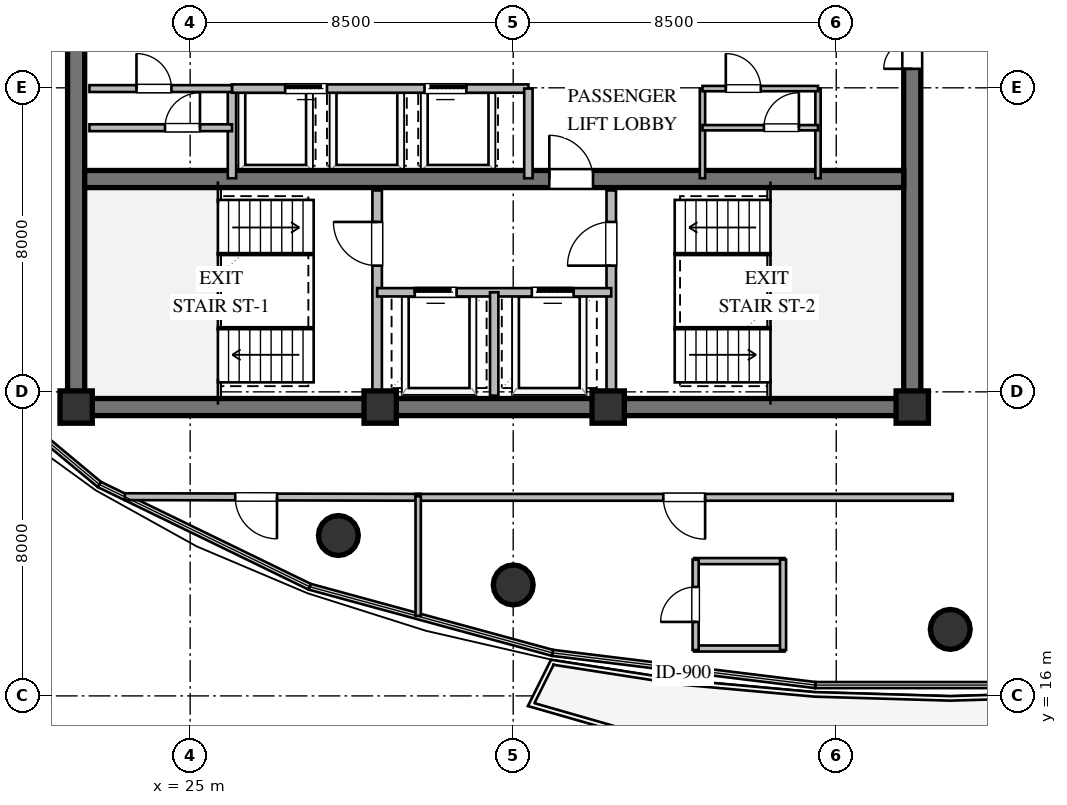
"""IFC4 building model, lengths in metres.
Left out: names, types, materials, properties, quantities, classifications, styles, units other than length and angle.
Written with IfcOpenShell. Run it as: python <this file> out.ifc"""

import sys

from ifc_helpers import new_model, si_unit, direction, frame, frame_2d, origin, origin_2d, place, context, subcontext, project, spatial, rectangle, circle, extrude, element, fill, save


model = new_model("IFC4")
c1 = context("Model", 3, precision=1e-05, world=origin(), true_north=direction((0.0, 1.0)))
c2 = subcontext(c1, "Body", "Model", "MODEL_VIEW")
j1 = project(units=[si_unit("LENGTHUNIT", "METRE"), si_unit("PLANEANGLEUNIT", "RADIAN")], contexts=[c1])
p1 = place(None, origin())
s1 = spatial("IfcSite", under=j1, at=p1, CompositionType="ELEMENT")
p2 = place(p1, origin())
s2 = spatial("IfcBuilding", under=s1, at=p2, CompositionType="ELEMENT")
p3 = place(p2, frame((0.0, 0.0, 224.4)))
s3 = spatial("IfcBuildingStorey", under=s2, at=p3, CompositionType="ELEMENT", Elevation=224.4)
p4 = place(p3, frame((21.775, 23.6, 0.0), z_axis=(0.0, 0.0, 1.0), x_axis=(1.0, 0.0, 0.0)))
e1 = element("IfcWall", 1, at=p4, inside=s3, PredefinedType="SHEAR", context=c2, shape_type="SweptSolid", body=[
    extrude(rectangle(XDim=22.45, YDim=0.45, at=frame_2d((11.225, 0.0))), origin(), (0.0, 0.0, 1.0), 3.36),
])
p5 = place(p3, frame((22.0, 23.825, 0.0), z_axis=(0.0, 0.0, 1.0), x_axis=(0.0, 1.0, 0.0)))
e2 = element("IfcWall", 2, at=p5, inside=s3, PredefinedType="SHEAR", context=c2, shape_type="SweptSolid", body=[
    extrude(rectangle(XDim=12.35, YDim=0.45, at=frame_2d((6.175, 0.0))), origin(), (0.0, 0.0, 1.0), 3.36),
])
p6 = place(p3, frame((44.0, 23.825, 0.0), z_axis=(0.0, 0.0, 1.0), x_axis=(0.0, 1.0, 0.0)))
e3 = element("IfcWall", 3, at=p6, inside=s3, PredefinedType="SHEAR", context=c2, shape_type="SweptSolid", body=[
    extrude(rectangle(XDim=12.35, YDim=0.45, at=frame_2d((6.175, 0.0))), origin(), (0.0, 0.0, 1.0), 3.36),
])
p7 = place(p6, frame((8.675, 0.0, 0.0)))
e4 = element("IfcOpeningElement", 4, at=p7, cuts=e3, PredefinedType="OPENING", context=c2, shape_type="SweptSolid", body=[
    extrude(rectangle(XDim=1.5, YDim=2.15, at=frame_2d((0.75, 1.075))), frame((0.0, 0.235, 0.0), z_axis=(0.0, -1.0, 0.0), x_axis=(1.0, 0.0, 0.0)), (0.0, 0.0, 1.0), 0.47),
])
p8 = place(p3, frame((22.225, 29.6, 0.0), z_axis=(0.0, 0.0, 1.0), x_axis=(1.0, 0.0, 0.0)))
e5 = element("IfcWall", 5, at=p8, inside=s3, PredefinedType="SHEAR", context=c2, shape_type="SweptSolid", body=[
    extrude(rectangle(XDim=21.55, YDim=0.45, at=frame_2d((10.775, 0.0))), origin(), (0.0, 0.0, 1.0), 3.36),
])
p9 = place(p8, frame((12.225, 0.0, 0.0)))
e6 = element("IfcOpeningElement", 6, at=p9, cuts=e5, PredefinedType="OPENING", context=c2, shape_type="SweptSolid", body=[
    extrude(rectangle(XDim=1.15, YDim=2.1, at=frame_2d((0.575, 1.05))), frame((0.0, 0.235, 0.0), z_axis=(0.0, -1.0, 0.0), x_axis=(1.0, 0.0, 0.0)), (0.0, 0.0, 1.0), 0.47),
])
for number, where, z_axis, x_axis in (
    (7, (22.0, 23.6, 0.0), (0.0, 0.0, 1.0), (1.0, 0.0, 0.0)),
    (8, (30.0, 23.6, 0.0), (0.0, 0.0, 1.0), (1.0, 0.0, 0.0)),
    (9, (36.0, 23.6, 0.0), (0.0, 0.0, 1.0), (1.0, 0.0, 0.0)),
    (10, (44.0, 23.6, 0.0), (0.0, 0.0, 1.0), (1.0, 0.0, 0.0)),
):
    element("IfcColumn", number, at=place(p3, frame(where, z_axis=z_axis, x_axis=x_axis)), inside=s3, PredefinedType="COLUMN", context=c2, shape_type="SweptSolid", body=[
        extrude(rectangle(XDim=0.85, YDim=0.85, at=origin_2d()), origin(), (0.0, 0.0, 1.0), 3.6),
    ])
for number, where, z_axis, x_axis in (
    (11, (28.9, 20.22, 0.0), (0.0, 0.0, 1.0), (1.0, 0.0, 0.0)),
    (12, (33.5, 18.92, 0.0), (0.0, 0.0, 1.0), (1.0, 0.0, 0.0)),
    (13, (45.0, 17.75, 0.0), (0.0, 0.0, 1.0), (1.0, 0.0, 0.0)),
):
    element("IfcColumn", number, at=place(p3, frame(where, z_axis=z_axis, x_axis=x_axis)), inside=s3, PredefinedType="COLUMN", context=c2, shape_type="SweptSolid", body=[
        extrude(circle(Radius=0.525, at=origin_2d()), origin(), (0.0, 0.0, 1.0), 3.6),
    ])
p10 = place(p3, frame((29.92, 23.9, 0.0), z_axis=(0.0, 0.0, 1.0), x_axis=(0.0, 1.0, 0.0)))
e14 = element("IfcWall", 14, at=p10, inside=s3, PredefinedType="SOLIDWALL", context=c2, shape_type="SweptSolid", body=[
    extrude(rectangle(XDim=5.4, YDim=0.25, at=frame_2d((2.7, 0.0))), origin(), (0.0, 0.0, 1.0), 3.36),
])
p11 = place(p10, frame((3.421, 0.0, 0.0)))
e15 = element("IfcOpeningElement", 15, at=p11, cuts=e14, PredefinedType="OPENING", context=c2, shape_type="SweptSolid", body=[
    extrude(rectangle(XDim=1.15, YDim=2.1, at=frame_2d((0.575, 1.05))), frame((0.0, 0.135, 0.0), z_axis=(0.0, -1.0, 0.0), x_axis=(1.0, 0.0, 0.0)), (0.0, 0.0, 1.0), 0.27),
])
p12 = place(p3, frame((36.08, 23.9, 0.0), z_axis=(0.0, 0.0, 1.0), x_axis=(0.0, 1.0, 0.0)))
e16 = element("IfcWall", 16, at=p12, inside=s3, PredefinedType="SOLIDWALL", context=c2, shape_type="SweptSolid", body=[
    extrude(rectangle(XDim=5.4, YDim=0.25, at=frame_2d((2.7, 0.0))), origin(), (0.0, 0.0, 1.0), 3.36),
])
p13 = place(p12, frame((3.421, 0.0, 0.0)))
e17 = element("IfcOpeningElement", 17, at=p13, cuts=e16, PredefinedType="OPENING", context=c2, shape_type="SweptSolid", body=[
    extrude(rectangle(XDim=1.15, YDim=2.1, at=frame_2d((0.575, 1.05))), frame((0.0, 0.135, 0.0), z_axis=(0.0, -1.0, 0.0), x_axis=(1.0, 0.0, 0.0)), (0.0, 0.0, 1.0), 0.27),
])
p14 = place(p3, frame((29.92, 26.62, 0.0), z_axis=(0.0, 0.0, 1.0), x_axis=(1.0, 0.0, 0.0)))
e18 = element("IfcWall", 18, at=p14, inside=s3, PredefinedType="SOLIDWALL", context=c2, shape_type="SweptSolid", body=[
    extrude(rectangle(XDim=6.16, YDim=0.22, at=frame_2d((3.08, 0.0))), origin(), (0.0, 0.0, 1.0), 3.36),
])
p15 = place(p14, frame((0.99, 0.0, 0.0)))
e19 = element("IfcOpeningElement", 19, at=p15, cuts=e18, PredefinedType="OPENING", context=c2, shape_type="SweptSolid", body=[
    extrude(rectangle(XDim=1.1, YDim=2.1, at=frame_2d((0.55, 1.05))), frame((0.0, 0.12, 0.0), z_axis=(0.0, -1.0, 0.0), x_axis=(1.0, 0.0, 0.0)), (0.0, 0.0, 1.0), 0.24),
])
p16 = place(p14, frame((4.07, 0.0, 0.0)))
e20 = element("IfcOpeningElement", 20, at=p16, cuts=e18, PredefinedType="OPENING", context=c2, shape_type="SweptSolid", body=[
    extrude(rectangle(XDim=1.1, YDim=2.1, at=frame_2d((0.55, 1.05))), frame((0.0, 0.12, 0.0), z_axis=(0.0, -1.0, 0.0), x_axis=(1.0, 0.0, 0.0)), (0.0, 0.0, 1.0), 0.24),
])
p17 = place(p3, frame((33.0, 23.9, 0.0), z_axis=(0.0, 0.0, 1.0), x_axis=(0.0, 1.0, 0.0)))
e21 = element("IfcWall", 21, at=p17, inside=s3, PredefinedType="SOLIDWALL", context=c2, shape_type="SweptSolid", body=[
    extrude(rectangle(XDim=2.72, YDim=0.22, at=frame_2d((1.36, 0.0))), origin(), (0.0, 0.0, 1.0), 3.36),
])
p18 = place(p3, frame((26.1, 29.62, 0.0), z_axis=(0.0, 0.0, 1.0), x_axis=(0.0, 1.0, 0.0)))
e22 = element("IfcWall", 22, at=p18, inside=s3, PredefinedType="SOLIDWALL", context=c2, shape_type="SweptSolid", body=[
    extrude(rectangle(XDim=2.36, YDim=0.22, at=frame_2d((1.18, 0.0))), origin(), (0.0, 0.0, 1.0), 3.36),
])
p19 = place(p3, frame((26.1, 31.98, 0.0), z_axis=(0.0, 0.0, 1.0), x_axis=(1.0, 0.0, 0.0)))
e23 = element("IfcWall", 23, at=p19, inside=s3, PredefinedType="SOLIDWALL", context=c2, shape_type="SweptSolid", body=[
    extrude(rectangle(XDim=7.8, YDim=0.22, at=frame_2d((3.9, 0.0))), origin(), (0.0, 0.0, 1.0), 3.36),
])
p20 = place(p19, frame((1.4, 0.0, 0.0)))
e24 = element("IfcOpeningElement", 24, at=p20, cuts=e23, PredefinedType="OPENING", context=c2, shape_type="SweptSolid", body=[
    extrude(rectangle(XDim=1.1, YDim=2.1, at=frame_2d((0.55, 1.05))), frame((0.0, 0.12, 0.0), z_axis=(0.0, -1.0, 0.0), x_axis=(1.0, 0.0, 0.0)), (0.0, 0.0, 1.0), 0.24),
])
p21 = place(p19, frame((5.066, 0.0, 0.0)))
e25 = element("IfcOpeningElement", 25, at=p21, cuts=e23, PredefinedType="OPENING", context=c2, shape_type="SweptSolid", body=[
    extrude(rectangle(XDim=1.1, YDim=2.1, at=frame_2d((0.55, 1.05))), frame((0.0, 0.12, 0.0), z_axis=(0.0, -1.0, 0.0), x_axis=(1.0, 0.0, 0.0)), (0.0, 0.0, 1.0), 0.24),
])
p22 = place(p3, frame((33.9, 29.62, 0.0), z_axis=(0.0, 0.0, 1.0), x_axis=(0.0, 1.0, 0.0)))
e26 = element("IfcWall", 26, at=p22, inside=s3, PredefinedType="SOLIDWALL", context=c2, shape_type="SweptSolid", body=[
    extrude(rectangle(XDim=2.36, YDim=0.22, at=frame_2d((1.18, 0.0))), origin(), (0.0, 0.0, 1.0), 3.36),
])
p23 = place(p3, frame((22.35, 30.95, 0.0), z_axis=(0.0, 0.0, 1.0), x_axis=(1.0, 0.0, 0.0)))
e27 = element("IfcWall", 27, at=p23, inside=s3, PredefinedType="PARTITIONING", context=c2, shape_type="SweptSolid", body=[
    extrude(rectangle(XDim=3.75, YDim=0.18, at=frame_2d((1.875, 0.0))), origin(), (0.0, 0.0, 1.0), 3.36),
])
p24 = place(p23, frame((1.988, 0.0, 0.0)))
e28 = element("IfcOpeningElement", 28, at=p24, cuts=e27, PredefinedType="OPENING", context=c2, shape_type="SweptSolid", body=[
    extrude(rectangle(XDim=0.92, YDim=2.1, at=frame_2d((0.46, 1.05))), frame((0.0, 0.1, 0.0), z_axis=(0.0, -1.0, 0.0), x_axis=(1.0, 0.0, 0.0)), (0.0, 0.0, 1.0), 0.2),
])
p25 = place(p3, frame((22.35, 31.98, 0.0), z_axis=(0.0, 0.0, 1.0), x_axis=(1.0, 0.0, 0.0)))
e29 = element("IfcWall", 29, at=p25, inside=s3, PredefinedType="PARTITIONING", context=c2, shape_type="SweptSolid", body=[
    extrude(rectangle(XDim=3.75, YDim=0.18, at=frame_2d((1.875, 0.0))), origin(), (0.0, 0.0, 1.0), 3.36),
])
p26 = place(p25, frame((1.238, 0.0, 0.0)))
e30 = element("IfcOpeningElement", 30, at=p26, cuts=e29, PredefinedType="OPENING", context=c2, shape_type="SweptSolid", body=[
    extrude(rectangle(XDim=0.92, YDim=2.1, at=frame_2d((0.46, 1.05))), frame((0.0, 0.1, 0.0), z_axis=(0.0, -1.0, 0.0), x_axis=(1.0, 0.0, 0.0)), (0.0, 0.0, 1.0), 0.2),
])
for number, where, z_axis, x_axis in (
    (31, (38.48, 29.62, 0.0), (0.0, 0.0, 1.0), (0.0, 1.0, 0.0)),
    (32, (41.52, 29.62, 0.0), (0.0, 0.0, 1.0), (0.0, 1.0, 0.0)),
):
    element("IfcWall", number, at=place(p3, frame(where, z_axis=z_axis, x_axis=x_axis)), inside=s3, PredefinedType="PARTITIONING", context=c2, shape_type="SweptSolid", body=[
        extrude(rectangle(XDim=2.36, YDim=0.14, at=frame_2d((1.18, 0.0))), origin(), (0.0, 0.0, 1.0), 3.36),
    ])
p27 = place(p3, frame((38.48, 30.95, 0.0), z_axis=(0.0, 0.0, 1.0), x_axis=(1.0, 0.0, 0.0)))
e33 = element("IfcWall", 33, at=p27, inside=s3, PredefinedType="PARTITIONING", context=c2, shape_type="SweptSolid", body=[
    extrude(rectangle(XDim=3.04, YDim=0.14, at=frame_2d((1.52, 0.0))), origin(), (0.0, 0.0, 1.0), 3.36),
])
p28 = place(p27, frame((1.617, 0.0, 0.0)))
e34 = element("IfcOpeningElement", 34, at=p28, cuts=e33, PredefinedType="OPENING", context=c2, shape_type="SweptSolid", body=[
    extrude(rectangle(XDim=0.92, YDim=2.1, at=frame_2d((0.46, 1.05))), frame((0.0, 0.08, 0.0), z_axis=(0.0, -1.0, 0.0), x_axis=(1.0, 0.0, 0.0)), (0.0, 0.0, 1.0), 0.16),
])
p29 = place(p3, frame((38.48, 31.98, 0.0), z_axis=(0.0, 0.0, 1.0), x_axis=(1.0, 0.0, 0.0)))
e35 = element("IfcWall", 35, at=p29, inside=s3, PredefinedType="PARTITIONING", context=c2, shape_type="SweptSolid", body=[
    extrude(rectangle(XDim=3.04, YDim=0.14, at=frame_2d((1.52, 0.0))), origin(), (0.0, 0.0, 1.0), 3.36),
])
p30 = place(p29, frame((0.614, 0.0, 0.0)))
e36 = element("IfcOpeningElement", 36, at=p30, cuts=e35, PredefinedType="OPENING", context=c2, shape_type="SweptSolid", body=[
    extrude(rectangle(XDim=0.92, YDim=2.1, at=frame_2d((0.46, 1.05))), frame((0.0, 0.08, 0.0), z_axis=(0.0, -1.0, 0.0), x_axis=(1.0, 0.0, 0.0)), (0.0, 0.0, 1.0), 0.16),
])
for number, where, z_axis, x_axis in (
    (37, (38.26, 17.247, 0.0), (0.0, 0.0, 1.0), (1.0, 0.0, 0.0)),
    (38, (38.26, 19.547, 0.0), (0.0, 0.0, 1.0), (1.0, 0.0, 0.0)),
):
    element("IfcWall", number, at=place(p3, frame(where, z_axis=z_axis, x_axis=x_axis)), inside=s3, PredefinedType="PLUMBINGWALL", context=c2, shape_type="SweptSolid", body=[
        extrude(rectangle(XDim=2.38, YDim=0.16, at=frame_2d((1.19, 0.0))), origin(), (0.0, 0.0, 1.0), 3.36),
    ])
p31 = place(p3, frame((38.3, 17.207, 0.0), z_axis=(0.0, 0.0, 1.0), x_axis=(0.0, 1.0, 0.0)))
e39 = element("IfcWall", 39, at=p31, inside=s3, PredefinedType="PLUMBINGWALL", context=c2, shape_type="SweptSolid", body=[
    extrude(rectangle(XDim=2.38, YDim=0.16, at=frame_2d((1.19, 0.0))), origin(), (0.0, 0.0, 1.0), 3.36),
])
p32 = place(p31, frame((0.74, 0.0, 0.0)))
e40 = element("IfcOpeningElement", 40, at=p32, cuts=e39, PredefinedType="OPENING", context=c2, shape_type="SweptSolid", body=[
    extrude(rectangle(XDim=0.92, YDim=2.1, at=frame_2d((0.46, 1.05))), frame((0.0, 0.09, 0.0), z_axis=(0.0, -1.0, 0.0), x_axis=(1.0, 0.0, 0.0)), (0.0, 0.0, 1.0), 0.18),
])
p33 = place(p3, frame((40.6, 17.207, 0.0), z_axis=(0.0, 0.0, 1.0), x_axis=(0.0, 1.0, 0.0)))
e41 = element("IfcWall", 41, at=p33, inside=s3, PredefinedType="PLUMBINGWALL", context=c2, shape_type="SweptSolid", body=[
    extrude(rectangle(XDim=2.38, YDim=0.16, at=frame_2d((1.19, 0.0))), origin(), (0.0, 0.0, 1.0), 3.36),
])
p34 = place(p3, frame((31.065, 21.225, 0.0), z_axis=(0.0, 0.0, 1.0), x_axis=(-0.999997658061, 0.002164225532, 0.0)))
e42 = element("IfcWall", 42, at=p34, inside=s3, PredefinedType="PARTITIONING", context=c2, shape_type="SweptSolid", body=[
    extrude(rectangle(XDim=7.784, YDim=0.18, at=frame_2d((3.892, 0.0))), origin(), (0.0, 0.0, 1.0), 2.89),
])
p35 = place(p34, frame((3.779, 0.0, 0.0)))
e43 = element("IfcOpeningElement", 43, at=p35, cuts=e42, PredefinedType="OPENING", context=c2, shape_type="SweptSolid", body=[
    extrude(rectangle(XDim=1.1, YDim=2.1, at=frame_2d((0.55, 1.05))), frame((0.0, 0.1, 0.0), z_axis=(0.0, -1.0, 0.0), x_axis=(1.0, 0.0, 0.0)), (0.0, 0.0, 1.0), 0.2),
])
p36 = place(p3, frame((45.065, 21.225, 0.0), z_axis=(0.0, 0.0, 1.0), x_axis=(-1.0, 0.0, 0.0)))
e44 = element("IfcWall", 44, at=p36, inside=s3, PredefinedType="PARTITIONING", context=c2, shape_type="SweptSolid", body=[
    extrude(rectangle(XDim=14.13, YDim=0.18, at=frame_2d((7.065, 0.0))), origin(), (0.0, 0.0, 1.0), 2.996),
])
p37 = place(p36, frame((6.515, 0.0, 0.0)))
e45 = element("IfcOpeningElement", 45, at=p37, cuts=e44, PredefinedType="OPENING", context=c2, shape_type="SweptSolid", body=[
    extrude(rectangle(XDim=1.1, YDim=2.1, at=frame_2d((0.55, 1.05))), frame((0.0, 0.1, 0.0), z_axis=(0.0, -1.0, 0.0), x_axis=(1.0, 0.0, 0.0)), (0.0, 0.0, 1.0), 0.2),
])
p38 = place(p3, frame((31.0, 21.255, 0.0), z_axis=(0.0, 0.0, 1.0), x_axis=(0.0, -1.0, 0.0)))
e46 = element("IfcWall", 46, at=p38, inside=s3, PredefinedType="PARTITIONING", context=c2, shape_type="SweptSolid", body=[
    extrude(rectangle(XDim=3.15, YDim=0.14, at=frame_2d((1.575, 0.0))), origin(), (0.0, 0.0, 1.0), 3.36),
])
p39 = place(p11, origin())
e47 = element("IfcDoor", 47, at=p39, inside=s3, OperationType="SINGLE_SWING_RIGHT", PredefinedType="DOOR", context=c2, shape_type="SweptSolid", body=[
    extrude(rectangle(XDim=1.15, YDim=2.1, at=frame_2d((0.575, 1.05))), frame((0.0, 0.025, 0.0), z_axis=(0.0, -1.0, 0.0), x_axis=(1.0, 0.0, 0.0)), (0.0, 0.0, 1.0), 0.05),
])
fill(e15, e47)
p40 = place(p13, origin())
e48 = element("IfcDoor", 48, at=p40, inside=s3, OperationType="SINGLE_SWING_LEFT", PredefinedType="DOOR", context=c2, shape_type="SweptSolid", body=[
    extrude(rectangle(XDim=1.15, YDim=2.1, at=frame_2d((0.575, 1.05))), frame((0.0, 0.025, 0.0), z_axis=(0.0, -1.0, 0.0), x_axis=(1.0, 0.0, 0.0)), (0.0, 0.0, 1.0), 0.05),
])
fill(e17, e48)
p41 = place(p15, origin())
e49 = element("IfcDoor", 49, at=p41, inside=s3, OperationType="SLIDING_TO_LEFT", PredefinedType="DOOR", context=c2, shape_type="SweptSolid", body=[
    extrude(rectangle(XDim=1.1, YDim=2.1, at=frame_2d((0.55, 1.05))), frame((0.0, 0.025, 0.0), z_axis=(0.0, -1.0, 0.0), x_axis=(1.0, 0.0, 0.0)), (0.0, 0.0, 1.0), 0.05),
])
fill(e19, e49)
p42 = place(p16, origin())
e50 = element("IfcDoor", 50, at=p42, inside=s3, OperationType="SLIDING_TO_RIGHT", PredefinedType="DOOR", context=c2, shape_type="SweptSolid", body=[
    extrude(rectangle(XDim=1.1, YDim=2.1, at=frame_2d((0.55, 1.05))), frame((0.0, 0.025, 0.0), z_axis=(0.0, -1.0, 0.0), x_axis=(1.0, 0.0, 0.0)), (0.0, 0.0, 1.0), 0.05),
])
fill(e20, e50)
p43 = place(p9, origin())
e51 = element("IfcDoor", 51, at=p43, inside=s3, OperationType="SINGLE_SWING_LEFT", PredefinedType="DOOR", context=c2, shape_type="SweptSolid", body=[
    extrude(rectangle(XDim=1.15, YDim=2.1, at=frame_2d((0.575, 1.05))), frame((0.0, 0.025, 0.0), z_axis=(0.0, -1.0, 0.0), x_axis=(1.0, 0.0, 0.0)), (0.0, 0.0, 1.0), 0.05),
])
fill(e6, e51)
p44 = place(p7, origin())
e52 = element("IfcDoor", 52, at=p44, inside=s3, OperationType="DOUBLE_DOOR_SINGLE_SWING", PredefinedType="DOOR", context=c2, shape_type="SweptSolid", body=[
    extrude(rectangle(XDim=1.5, YDim=2.15, at=frame_2d((0.75, 1.075))), frame((0.0, 0.025, 0.0), z_axis=(0.0, -1.0, 0.0), x_axis=(1.0, 0.0, 0.0)), (0.0, 0.0, 1.0), 0.05),
])
fill(e4, e52)
p45 = place(p20, origin())
e53 = element("IfcDoor", 53, at=p45, inside=s3, OperationType="SLIDING_TO_LEFT", PredefinedType="DOOR", context=c2, shape_type="SweptSolid", body=[
    extrude(rectangle(XDim=1.1, YDim=2.1, at=frame_2d((0.55, 1.05))), frame((0.0, 0.025, 0.0), z_axis=(0.0, -1.0, 0.0), x_axis=(1.0, 0.0, 0.0)), (0.0, 0.0, 1.0), 0.05),
])
fill(e24, e53)
p46 = place(p21, origin())
e54 = element("IfcDoor", 54, at=p46, inside=s3, OperationType="SLIDING_TO_RIGHT", PredefinedType="DOOR", context=c2, shape_type="SweptSolid", body=[
    extrude(rectangle(XDim=1.1, YDim=2.1, at=frame_2d((0.55, 1.05))), frame((0.0, 0.025, 0.0), z_axis=(0.0, -1.0, 0.0), x_axis=(1.0, 0.0, 0.0)), (0.0, 0.0, 1.0), 0.05),
])
fill(e25, e54)
p47 = place(p26, origin())
e55 = element("IfcDoor", 55, at=p47, inside=s3, OperationType="SINGLE_SWING_LEFT", PredefinedType="DOOR", context=c2, shape_type="SweptSolid", body=[
    extrude(rectangle(XDim=0.92, YDim=2.1, at=frame_2d((0.46, 1.05))), frame((0.0, 0.025, 0.0), z_axis=(0.0, -1.0, 0.0), x_axis=(1.0, 0.0, 0.0)), (0.0, 0.0, 1.0), 0.05),
])
fill(e30, e55)
p48 = place(p24, origin())
e56 = element("IfcDoor", 56, at=p48, inside=s3, OperationType="SINGLE_SWING_RIGHT", PredefinedType="DOOR", context=c2, shape_type="SweptSolid", body=[
    extrude(rectangle(XDim=0.92, YDim=2.1, at=frame_2d((0.46, 1.05))), frame((0.0, 0.025, 0.0), z_axis=(0.0, -1.0, 0.0), x_axis=(1.0, 0.0, 0.0)), (0.0, 0.0, 1.0), 0.05),
])
fill(e28, e56)
p49 = place(p30, origin())
e57 = element("IfcDoor", 57, at=p49, inside=s3, OperationType="SINGLE_SWING_LEFT", PredefinedType="DOOR", context=c2, shape_type="SweptSolid", body=[
    extrude(rectangle(XDim=0.92, YDim=2.1, at=frame_2d((0.46, 1.05))), frame((0.0, 0.025, 0.0), z_axis=(0.0, -1.0, 0.0), x_axis=(1.0, 0.0, 0.0)), (0.0, 0.0, 1.0), 0.05),
])
fill(e36, e57)
p50 = place(p28, origin())
e58 = element("IfcDoor", 58, at=p50, inside=s3, OperationType="SINGLE_SWING_RIGHT", PredefinedType="DOOR", context=c2, shape_type="SweptSolid", body=[
    extrude(rectangle(XDim=0.92, YDim=2.1, at=frame_2d((0.46, 1.05))), frame((0.0, 0.025, 0.0), z_axis=(0.0, -1.0, 0.0), x_axis=(1.0, 0.0, 0.0)), (0.0, 0.0, 1.0), 0.05),
])
fill(e34, e58)
p51 = place(p32, origin())
e59 = element("IfcDoor", 59, at=p51, inside=s3, OperationType="SINGLE_SWING_LEFT", PredefinedType="DOOR", context=c2, shape_type="SweptSolid", body=[
    extrude(rectangle(XDim=0.92, YDim=2.1, at=frame_2d((0.46, 1.05))), frame((0.0, 0.025, 0.0), z_axis=(0.0, -1.0, 0.0), x_axis=(1.0, 0.0, 0.0)), (0.0, 0.0, 1.0), 0.05),
])
fill(e40, e59)
p52 = place(p35, origin())
e60 = element("IfcDoor", 60, at=p52, inside=s3, OperationType="SINGLE_SWING_LEFT", PredefinedType="DOOR", context=c2, shape_type="SweptSolid", body=[
    extrude(rectangle(XDim=1.1, YDim=2.1, at=frame_2d((0.55, 1.05))), frame((0.0, 0.025, 0.0), z_axis=(0.0, -1.0, 0.0), x_axis=(1.0, 0.0, 0.0)), (0.0, 0.0, 1.0), 0.05),
])
fill(e43, e60)
p53 = place(p37, origin())
e61 = element("IfcDoor", 61, at=p53, inside=s3, OperationType="SINGLE_SWING_LEFT", PredefinedType="DOOR", context=c2, shape_type="SweptSolid", body=[
    extrude(rectangle(XDim=1.1, YDim=2.1, at=frame_2d((0.55, 1.05))), frame((0.0, 0.025, 0.0), z_axis=(0.0, -1.0, 0.0), x_axis=(1.0, 0.0, 0.0)), (0.0, 0.0, 1.0), 0.05),
])
fill(e45, e61)
save(model, sys.argv[1])
